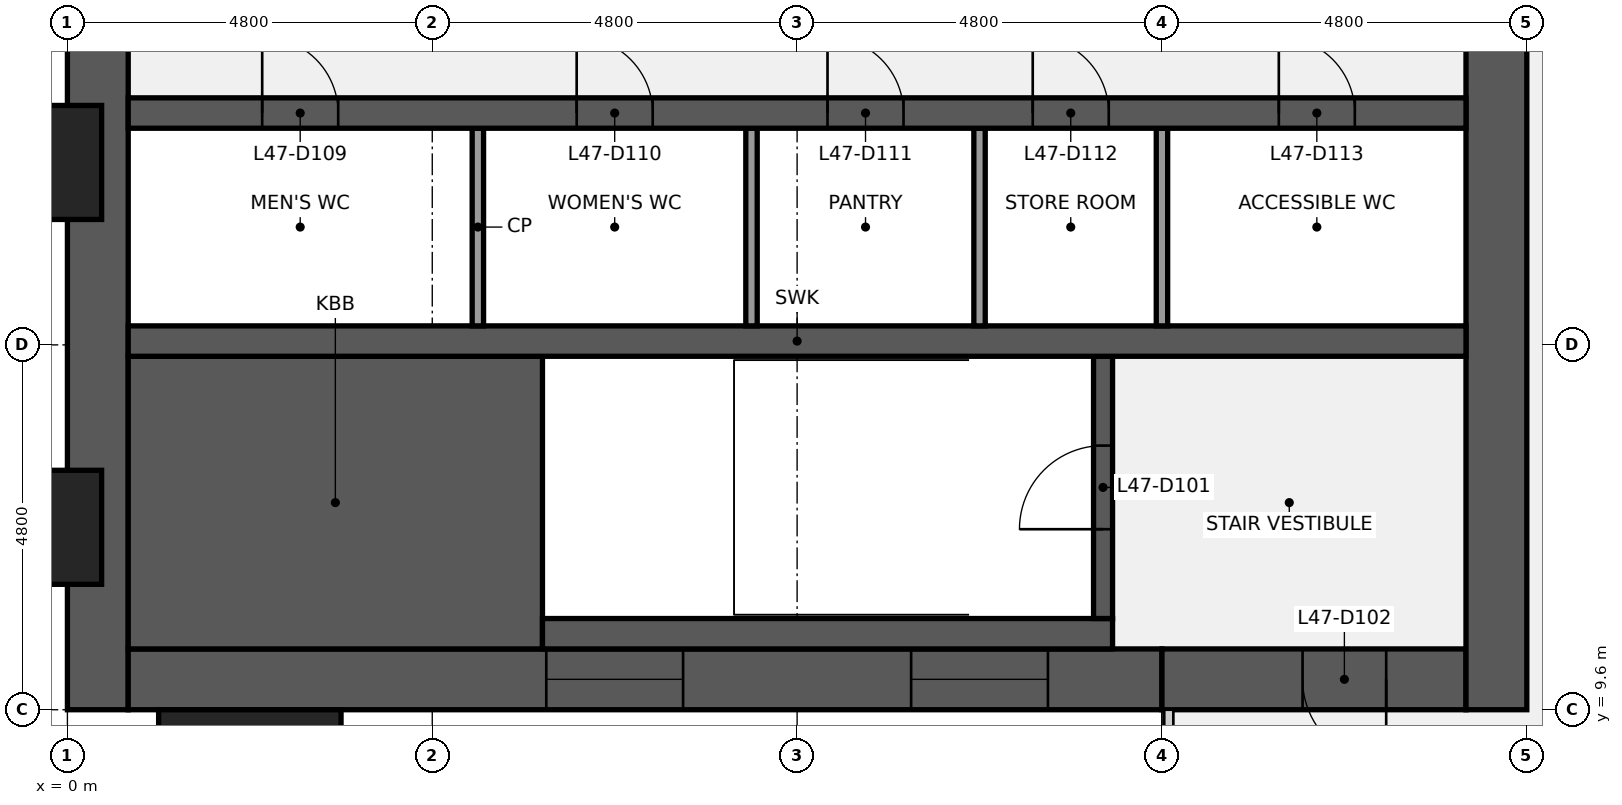
"""IFC4 building model, lengths in metres.
Left out: names, types, materials, properties, quantities, classifications, styles, units other than length and angle.
Written with IfcOpenShell. Run it as: python <this file> out.ifc"""

import sys

from ifc_helpers import new_model, si_unit, direction, frame, frame_2d, origin, origin_2d, place, context, subcontext, project, spatial, rectangle, extrude, element, fill, save


model = new_model("IFC4")
c1 = context("Model", 3, precision=1e-05, world=origin(), true_north=direction((0.0, 1.0)))
c2 = subcontext(c1, "Body", "Model", "MODEL_VIEW")
j1 = project(units=[si_unit("LENGTHUNIT", "METRE"), si_unit("PLANEANGLEUNIT", "RADIAN")], contexts=[c1])
p1 = place(None, origin())
s1 = spatial("IfcSite", under=j1, at=p1, CompositionType="ELEMENT")
p2 = place(p1, origin())
s2 = spatial("IfcBuilding", under=s1, at=p2, CompositionType="ELEMENT")
p3 = place(p2, frame((0.0, 0.0, 217.2)))
s3 = spatial("IfcBuildingStorey", under=s2, at=p3, CompositionType="ELEMENT", Elevation=217.2)
p4 = place(p3, frame((0.4, 9.6, 0.0), z_axis=(0.0, 0.0, 1.0), x_axis=(0.0, 1.0, 0.0)))
e1 = element("IfcWall", 1, at=p4, inside=s3, PredefinedType="SHEAR", context=c2, shape_type="SweptSolid", body=[
    extrude(rectangle(XDim=28.8, YDim=0.8, at=frame_2d((14.4, 0.0))), origin(), (0.0, 0.0, 1.0), 3.84),
])
p5 = place(p4, frame((8.85, 0.0, 0.9)))
e2 = element("IfcOpeningElement", 2, at=p5, cuts=e1, PredefinedType="OPENING", context=c2, shape_type="SweptSolid", body=[
    extrude(rectangle(XDim=1.5, YDim=1.5, at=frame_2d((0.75, 0.75))), frame((0.0, 0.41, 0.0), z_axis=(0.0, -1.0, 0.0), x_axis=(1.0, 0.0, 0.0)), (0.0, 0.0, 1.0), 0.82),
])
p6 = place(p4, frame((18.45, 0.0, 0.9)))
e3 = element("IfcOpeningElement", 3, at=p6, cuts=e1, PredefinedType="OPENING", context=c2, shape_type="SweptSolid", body=[
    extrude(rectangle(XDim=1.5, YDim=1.5, at=frame_2d((0.75, 0.75))), frame((0.0, 0.41, 0.0), z_axis=(0.0, -1.0, 0.0), x_axis=(1.0, 0.0, 0.0)), (0.0, 0.0, 1.0), 0.82),
])
p7 = place(p3, frame((14.4, 10.0, 0.0), z_axis=(0.0, 0.0, 1.0), x_axis=(-1.0, 0.0, 0.0)))
e4 = element("IfcWall", 4, at=p7, inside=s3, PredefinedType="SHEAR", context=c2, shape_type="SweptSolid", body=[
    extrude(rectangle(XDim=13.6, YDim=0.8, at=frame_2d((6.8, 0.0))), origin(), (0.0, 0.0, 1.0), 3.84),
])
p8 = place(p7, frame((6.3, 0.0, 0.9)))
e5 = element("IfcOpeningElement", 5, at=p8, cuts=e4, PredefinedType="OPENING", context=c2, shape_type="SweptSolid", body=[
    extrude(rectangle(XDim=1.8, YDim=1.5, at=frame_2d((0.9, 0.75))), frame((0.0, 0.41, 0.0), z_axis=(0.0, -1.0, 0.0), x_axis=(1.0, 0.0, 0.0)), (0.0, 0.0, 1.0), 0.82),
])
p9 = place(p7, frame((1.5, 0.0, 0.9)))
e6 = element("IfcOpeningElement", 6, at=p9, cuts=e4, PredefinedType="OPENING", context=c2, shape_type="SweptSolid", body=[
    extrude(rectangle(XDim=1.8, YDim=1.5, at=frame_2d((0.9, 0.75))), frame((0.0, 0.41, 0.0), z_axis=(0.0, -1.0, 0.0), x_axis=(1.0, 0.0, 0.0)), (0.0, 0.0, 1.0), 0.82),
])
p10 = place(p3, frame((18.4, 10.0, 0.0), z_axis=(0.0, 0.0, 1.0), x_axis=(-1.0, 0.0, 0.0)))
e7 = element("IfcWall", 7, at=p10, inside=s3, PredefinedType="SHEAR", context=c2, shape_type="SweptSolid", body=[
    extrude(rectangle(XDim=4.0, YDim=0.8, at=frame_2d((2.0, 0.0))), origin(), (0.0, 0.0, 1.0), 3.84),
])
p11 = place(p10, frame((1.05, 0.0, 0.0)))
e8 = element("IfcOpeningElement", 8, at=p11, cuts=e7, PredefinedType="OPENING", context=c2, shape_type="SweptSolid", body=[
    extrude(rectangle(XDim=1.1, YDim=2.1, at=frame_2d((0.55, 1.05))), frame((0.0, 0.41, 0.0), z_axis=(0.0, -1.0, 0.0), x_axis=(1.0, 0.0, 0.0)), (0.0, 0.0, 1.0), 0.82),
])
p12 = place(p3, frame((18.8, 38.4, 0.0), z_axis=(0.0, 0.0, 1.0), x_axis=(0.0, -1.0, 0.0)))
e9 = element("IfcWall", 9, at=p12, inside=s3, PredefinedType="SHEAR", context=c2, shape_type="SweptSolid", body=[
    extrude(rectangle(XDim=28.8, YDim=0.8, at=frame_2d((14.4, 0.0))), origin(), (0.0, 0.0, 1.0), 3.84),
])
p13 = place(p12, frame((18.3, 0.0, 0.0)))
e10 = element("IfcOpeningElement", 10, at=p13, cuts=e9, PredefinedType="OPENING", context=c2, shape_type="SweptSolid", body=[
    extrude(rectangle(XDim=1.8, YDim=2.1, at=frame_2d((0.9, 1.05))), frame((0.0, 0.41, 0.0), z_axis=(0.0, -1.0, 0.0), x_axis=(1.0, 0.0, 0.0)), (0.0, 0.0, 1.0), 0.82),
])
p14 = place(p12, frame((8.7, 0.0, 0.0)))
e11 = element("IfcOpeningElement", 11, at=p14, cuts=e9, PredefinedType="OPENING", context=c2, shape_type="SweptSolid", body=[
    extrude(rectangle(XDim=1.8, YDim=2.1, at=frame_2d((0.9, 1.05))), frame((0.0, 0.41, 0.0), z_axis=(0.0, -1.0, 0.0), x_axis=(1.0, 0.0, 0.0)), (0.0, 0.0, 1.0), 0.82),
])
p15 = place(p3, frame((0.8, 12.325, 0.0), z_axis=(0.0, 0.0, 1.0), x_axis=(1.0, 0.0, 0.0)))
e12 = element("IfcWall", 12, at=p15, inside=s3, PredefinedType="SHEAR", context=c2, shape_type="SweptSolid", body=[
    extrude(rectangle(XDim=5.45, YDim=3.85, at=frame_2d((2.725, 0.0))), origin(), (0.0, 0.0, 1.0), 3.84),
])
p16 = place(p3, frame((6.25, 10.6, 0.0), z_axis=(0.0, 0.0, 1.0), x_axis=(1.0, 0.0, 0.0)))
e13 = element("IfcWall", 13, at=p16, inside=s3, PredefinedType="SHEAR", context=c2, shape_type="SweptSolid", body=[
    extrude(rectangle(XDim=7.5, YDim=0.4, at=frame_2d((3.75, 0.0))), origin(), (0.0, 0.0, 1.0), 3.84),
])
p17 = place(p3, frame((13.625, 10.8, 0.0), z_axis=(0.0, 0.0, 1.0), x_axis=(0.0, 1.0, 0.0)))
e14 = element("IfcWall", 14, at=p17, inside=s3, PredefinedType="SHEAR", context=c2, shape_type="SweptSolid", body=[
    extrude(rectangle(XDim=3.45, YDim=0.25, at=frame_2d((1.725, 0.0))), origin(), (0.0, 0.0, 1.0), 3.84),
])
p18 = place(p17, frame((1.175, 0.0, 0.0)))
e15 = element("IfcOpeningElement", 15, at=p18, cuts=e14, PredefinedType="OPENING", context=c2, shape_type="SweptSolid", body=[
    extrude(rectangle(XDim=1.1, YDim=2.1, at=frame_2d((0.55, 1.05))), frame((0.0, 0.135, 0.0), z_axis=(0.0, -1.0, 0.0), x_axis=(1.0, 0.0, 0.0)), (0.0, 0.0, 1.0), 0.27),
])
p19 = place(p3, frame((0.8, 14.45, 0.0), z_axis=(0.0, 0.0, 1.0), x_axis=(1.0, 0.0, 0.0)))
e16 = element("IfcWall", 16, at=p19, inside=s3, PredefinedType="SHEAR", context=c2, shape_type="SweptSolid", body=[
    extrude(rectangle(XDim=17.6, YDim=0.4, at=frame_2d((8.8, 0.0))), origin(), (0.0, 0.0, 1.0), 3.84),
])
for number, where, z_axis, x_axis in (
    (17, (5.4, 14.65, 0.0), (0.0, 0.0, 1.0), (0.0, 1.0, 0.0)),
    (18, (9.0, 14.65, 0.0), (0.0, 0.0, 1.0), (0.0, 1.0, 0.0)),
    (19, (12.0, 14.65, 0.0), (0.0, 0.0, 1.0), (0.0, 1.0, 0.0)),
    (20, (14.4, 14.65, 0.0), (0.0, 0.0, 1.0), (0.0, 1.0, 0.0)),
):
    element("IfcWall", number, at=place(p3, frame(where, z_axis=z_axis, x_axis=x_axis)), inside=s3, PredefinedType="PARTITIONING", context=c2, shape_type="SweptSolid", body=[
        extrude(rectangle(XDim=2.6, YDim=0.15, at=frame_2d((1.3, 0.0))), origin(), (0.0, 0.0, 1.0), 3.84),
    ])
p20 = place(p3, frame((0.8, 17.45, 0.0), z_axis=(0.0, 0.0, 1.0), x_axis=(1.0, 0.0, 0.0)))
e21 = element("IfcWall", 21, at=p20, inside=s3, PredefinedType="SHEAR", context=c2, shape_type="SweptSolid", body=[
    extrude(rectangle(XDim=17.6, YDim=0.4, at=frame_2d((8.8, 0.0))), origin(), (0.0, 0.0, 1.0), 3.84),
])
p21 = place(p20, frame((1.762, 0.0, 0.0)))
e22 = element("IfcOpeningElement", 22, at=p21, cuts=e21, PredefinedType="OPENING", context=c2, shape_type="SweptSolid", body=[
    extrude(rectangle(XDim=1.0, YDim=2.1, at=frame_2d((0.5, 1.05))), frame((0.0, 0.21, 0.0), z_axis=(0.0, -1.0, 0.0), x_axis=(1.0, 0.0, 0.0)), (0.0, 0.0, 1.0), 0.42),
])
p22 = place(p20, frame((5.9, 0.0, 0.0)))
e23 = element("IfcOpeningElement", 23, at=p22, cuts=e21, PredefinedType="OPENING", context=c2, shape_type="SweptSolid", body=[
    extrude(rectangle(XDim=1.0, YDim=2.1, at=frame_2d((0.5, 1.05))), frame((0.0, 0.21, 0.0), z_axis=(0.0, -1.0, 0.0), x_axis=(1.0, 0.0, 0.0)), (0.0, 0.0, 1.0), 0.42),
])
p23 = place(p20, frame((9.2, 0.0, 0.0)))
e24 = element("IfcOpeningElement", 24, at=p23, cuts=e21, PredefinedType="OPENING", context=c2, shape_type="SweptSolid", body=[
    extrude(rectangle(XDim=1.0, YDim=2.1, at=frame_2d((0.5, 1.05))), frame((0.0, 0.21, 0.0), z_axis=(0.0, -1.0, 0.0), x_axis=(1.0, 0.0, 0.0)), (0.0, 0.0, 1.0), 0.42),
])
p24 = place(p20, frame((11.9, 0.0, 0.0)))
e25 = element("IfcOpeningElement", 25, at=p24, cuts=e21, PredefinedType="OPENING", context=c2, shape_type="SweptSolid", body=[
    extrude(rectangle(XDim=1.0, YDim=2.1, at=frame_2d((0.5, 1.05))), frame((0.0, 0.21, 0.0), z_axis=(0.0, -1.0, 0.0), x_axis=(1.0, 0.0, 0.0)), (0.0, 0.0, 1.0), 0.42),
])
p25 = place(p20, frame((15.137, 0.0, 0.0)))
e26 = element("IfcOpeningElement", 26, at=p25, cuts=e21, PredefinedType="OPENING", context=c2, shape_type="SweptSolid", body=[
    extrude(rectangle(XDim=1.0, YDim=2.1, at=frame_2d((0.5, 1.05))), frame((0.0, 0.21, 0.0), z_axis=(0.0, -1.0, 0.0), x_axis=(1.0, 0.0, 0.0)), (0.0, 0.0, 1.0), 0.42),
])
for number, where, z_axis, x_axis in (
    (27, (-0.75, 12.0, 0.0), (0.0, 0.0, 1.0), (0.0, 1.0, 0.0)),
    (28, (-0.75, 16.8, 0.0), (0.0, 0.0, 1.0), (0.0, 1.0, 0.0)),
    (29, (2.4, 8.85, 0.0), (0.0, 0.0, 1.0), (1.0, 0.0, 0.0)),
):
    element("IfcColumn", number, at=place(p3, frame(where, z_axis=z_axis, x_axis=x_axis)), inside=s3, PredefinedType="PILASTER", context=c2, shape_type="SweptSolid", body=[
        extrude(rectangle(XDim=2.4, YDim=1.5, at=origin_2d()), origin(), (0.0, 0.0, 1.0), 4.0),
    ])
p26 = place(p18, origin())
e30 = element("IfcDoor", 30, at=p26, inside=s3, OperationType="SINGLE_SWING_LEFT", PredefinedType="DOOR", context=c2, shape_type="SweptSolid", body=[
    extrude(rectangle(XDim=1.1, YDim=2.1, at=frame_2d((0.55, 1.05))), frame((0.0, 0.025, 0.0), z_axis=(0.0, -1.0, 0.0), x_axis=(1.0, 0.0, 0.0)), (0.0, 0.0, 1.0), 0.05),
])
fill(e15, e30)
p27 = place(p11, origin())
e31 = element("IfcDoor", 31, at=p27, inside=s3, OperationType="SINGLE_SWING_LEFT", PredefinedType="DOOR", context=c2, shape_type="SweptSolid", body=[
    extrude(rectangle(XDim=1.1, YDim=2.1, at=frame_2d((0.55, 1.05))), frame((0.0, 0.025, 0.0), z_axis=(0.0, -1.0, 0.0), x_axis=(1.0, 0.0, 0.0)), (0.0, 0.0, 1.0), 0.05),
])
fill(e8, e31)
p28 = place(p21, origin())
e32 = element("IfcDoor", 32, at=p28, inside=s3, OperationType="SINGLE_SWING_LEFT", PredefinedType="DOOR", context=c2, shape_type="SweptSolid", body=[
    extrude(rectangle(XDim=1.0, YDim=2.1, at=frame_2d((0.5, 1.05))), frame((0.0, 0.025, 0.0), z_axis=(0.0, -1.0, 0.0), x_axis=(1.0, 0.0, 0.0)), (0.0, 0.0, 1.0), 0.05),
])
fill(e22, e32)
p29 = place(p22, origin())
e33 = element("IfcDoor", 33, at=p29, inside=s3, OperationType="SINGLE_SWING_LEFT", PredefinedType="DOOR", context=c2, shape_type="SweptSolid", body=[
    extrude(rectangle(XDim=1.0, YDim=2.1, at=frame_2d((0.5, 1.05))), frame((0.0, 0.025, 0.0), z_axis=(0.0, -1.0, 0.0), x_axis=(1.0, 0.0, 0.0)), (0.0, 0.0, 1.0), 0.05),
])
fill(e23, e33)
p30 = place(p23, origin())
e34 = element("IfcDoor", 34, at=p30, inside=s3, OperationType="SINGLE_SWING_LEFT", PredefinedType="DOOR", context=c2, shape_type="SweptSolid", body=[
    extrude(rectangle(XDim=1.0, YDim=2.1, at=frame_2d((0.5, 1.05))), frame((0.0, 0.025, 0.0), z_axis=(0.0, -1.0, 0.0), x_axis=(1.0, 0.0, 0.0)), (0.0, 0.0, 1.0), 0.05),
])
fill(e24, e34)
p31 = place(p24, origin())
e35 = element("IfcDoor", 35, at=p31, inside=s3, OperationType="SINGLE_SWING_LEFT", PredefinedType="DOOR", context=c2, shape_type="SweptSolid", body=[
    extrude(rectangle(XDim=1.0, YDim=2.1, at=frame_2d((0.5, 1.05))), frame((0.0, 0.025, 0.0), z_axis=(0.0, -1.0, 0.0), x_axis=(1.0, 0.0, 0.0)), (0.0, 0.0, 1.0), 0.05),
])
fill(e25, e35)
p32 = place(p25, origin())
e36 = element("IfcDoor", 36, at=p32, inside=s3, OperationType="SINGLE_SWING_LEFT", PredefinedType="DOOR", context=c2, shape_type="SweptSolid", body=[
    extrude(rectangle(XDim=1.0, YDim=2.1, at=frame_2d((0.5, 1.05))), frame((0.0, 0.025, 0.0), z_axis=(0.0, -1.0, 0.0), x_axis=(1.0, 0.0, 0.0)), (0.0, 0.0, 1.0), 0.05),
])
fill(e26, e36)
p33 = place(p8, origin())
e37 = element("IfcWindow", 37, at=p33, inside=s3, PartitioningType="SINGLE_PANEL", PredefinedType="WINDOW", context=c2, shape_type="SweptSolid", body=[
    extrude(rectangle(XDim=1.8, YDim=1.5, at=frame_2d((0.9, 0.75))), frame((0.0, 0.03, 0.0), z_axis=(0.0, -1.0, 0.0), x_axis=(1.0, 0.0, 0.0)), (0.0, 0.0, 1.0), 0.06),
])
fill(e5, e37)
p34 = place(p9, origin())
e38 = element("IfcWindow", 38, at=p34, inside=s3, PartitioningType="SINGLE_PANEL", PredefinedType="WINDOW", context=c2, shape_type="SweptSolid", body=[
    extrude(rectangle(XDim=1.8, YDim=1.5, at=frame_2d((0.9, 0.75))), frame((0.0, 0.03, 0.0), z_axis=(0.0, -1.0, 0.0), x_axis=(1.0, 0.0, 0.0)), (0.0, 0.0, 1.0), 0.06),
])
fill(e6, e38)
save(model, sys.argv[1])
